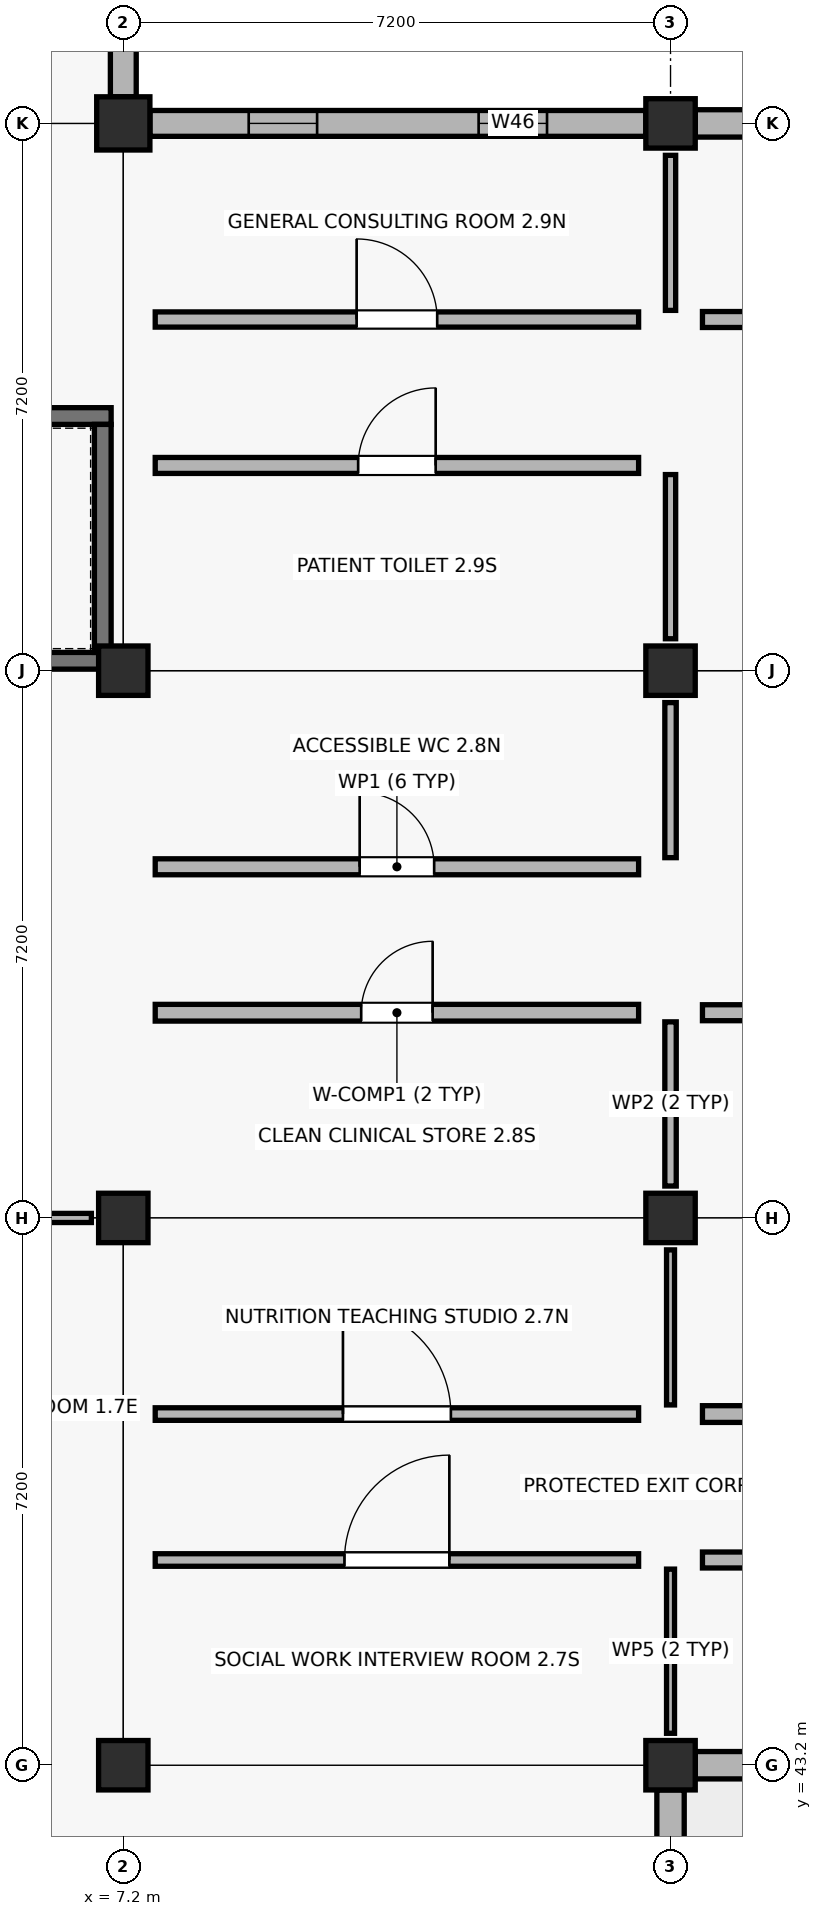
"""IFC4 building model, lengths in metres.
Left out: names, types, materials, properties, quantities, classifications, styles, units other than length and angle.
Written with IfcOpenShell. Run it as: python <this file> out.ifc"""

import sys

from ifc_helpers import new_model, si_unit, direction, frame, frame_2d, origin, origin_2d, place, context, subcontext, project, spatial, rectangle, extrude, element, fill, save


model = new_model("IFC4")
c1 = context("Model", 3, precision=1e-05, world=origin(), true_north=direction((0.0, 1.0)))
c2 = subcontext(c1, "Body", "Model", "MODEL_VIEW")
j1 = project(units=[si_unit("LENGTHUNIT", "METRE"), si_unit("PLANEANGLEUNIT", "RADIAN")], contexts=[c1])
p1 = place(None, origin())
s1 = spatial("IfcSite", under=j1, at=p1, CompositionType="ELEMENT")
p2 = place(p1, origin())
s2 = spatial("IfcBuilding", under=s1, at=p2, CompositionType="ELEMENT")
p3 = place(p2, origin())
s3 = spatial("IfcBuildingStorey", under=s2, at=p3, CompositionType="ELEMENT", Elevation=0.0)
for number, where, z_axis, x_axis in (
    (1, (7.2, 43.2, -0.25), (0.0, 0.0, 1.0), (1.0, 0.0, 0.0)),
    (2, (7.2, 50.4, -0.25), (0.0, 0.0, 1.0), (1.0, 0.0, 0.0)),
    (3, (7.2, 57.6, -0.25), (0.0, 0.0, 1.0), (1.0, 0.0, 0.0)),
):
    element("IfcColumn", number, at=place(p3, frame(where, z_axis=z_axis, x_axis=x_axis)), inside=s3, PredefinedType="COLUMN", context=c2, shape_type="SweptSolid", body=[
        extrude(rectangle(XDim=0.65, YDim=0.65, at=origin_2d()), origin(), (0.0, 0.0, 1.0), 4.75),
    ])
p4 = place(p3, frame((7.2, 64.8, -0.25), z_axis=(0.0, 0.0, 1.0), x_axis=(1.0, 0.0, 0.0)))
e4 = element("IfcColumn", 4, at=p4, inside=s3, PredefinedType="COLUMN", context=c2, shape_type="SweptSolid", body=[
    extrude(rectangle(XDim=0.7, YDim=0.7, at=origin_2d()), origin(), (0.0, 0.0, 1.0), 4.75),
])
for number, where, z_axis, x_axis in (
    (5, (14.4, 43.2, -0.25), (0.0, 0.0, 1.0), (1.0, 0.0, 0.0)),
    (6, (14.4, 50.4, -0.25), (0.0, 0.0, 1.0), (1.0, 0.0, 0.0)),
    (7, (14.4, 57.6, -0.25), (0.0, 0.0, 1.0), (1.0, 0.0, 0.0)),
    (8, (14.4, 64.8, -0.25), (0.0, 0.0, 1.0), (1.0, 0.0, 0.0)),
):
    element("IfcColumn", number, at=place(p3, frame(where, z_axis=z_axis, x_axis=x_axis)), inside=s3, PredefinedType="COLUMN", context=c2, shape_type="SweptSolid", body=[
        extrude(rectangle(XDim=0.65, YDim=0.65, at=origin_2d()), origin(), (0.0, 0.0, 1.0), 4.75),
    ])
p5 = place(p3, frame((7.2, 65.15, 0.0), z_axis=(0.0, 0.0, 1.0), x_axis=(0.0, 1.0, 0.0)))
e9 = element("IfcWall", 9, at=p5, inside=s3, PredefinedType="SOLIDWALL", context=c2, shape_type="SweptSolid", body=[
    extrude(rectangle(XDim=6.5, YDim=0.34, at=frame_2d((3.25, 0.0))), origin(), (0.0, 0.0, 1.0), 3.52),
])
p6 = place(p5, frame((0.775, 0.0, 0.9)))
e10 = element("IfcOpeningElement", 10, at=p6, cuts=e9, PredefinedType="OPENING", context=c2, shape_type="SweptSolid", body=[
    extrude(rectangle(XDim=1.95, YDim=1.5, at=frame_2d((0.975, 0.75))), frame((0.0, 0.18, 0.0), z_axis=(0.0, -1.0, 0.0), x_axis=(1.0, 0.0, 0.0)), (0.0, 0.0, 1.0), 0.36),
])
p7 = place(p5, frame((3.775, 0.0, 0.9)))
e11 = element("IfcOpeningElement", 11, at=p7, cuts=e9, PredefinedType="OPENING", context=c2, shape_type="SweptSolid", body=[
    extrude(rectangle(XDim=1.95, YDim=1.5, at=frame_2d((0.975, 0.75))), frame((0.0, 0.18, 0.0), z_axis=(0.0, -1.0, 0.0), x_axis=(1.0, 0.0, 0.0)), (0.0, 0.0, 1.0), 0.36),
])
p8 = place(p3, frame((14.4, 36.325, 0.0), z_axis=(0.0, 0.0, 1.0), x_axis=(0.0, 1.0, 0.0)))
e12 = element("IfcWall", 12, at=p8, inside=s3, PredefinedType="SOLIDWALL", context=c2, shape_type="SweptSolid", body=[
    extrude(rectangle(XDim=6.55, YDim=0.36, at=frame_2d((3.275, 0.0))), origin(), (0.0, 0.0, 1.0), 3.52),
])
p9 = place(p8, frame((1.0, 0.0, 0.9)))
e13 = element("IfcOpeningElement", 13, at=p9, cuts=e12, PredefinedType="OPENING", context=c2, shape_type="SweptSolid", body=[
    extrude(rectangle(XDim=1.5, YDim=1.75, at=frame_2d((0.75, 0.875))), frame((0.0, 0.19, 0.0), z_axis=(0.0, -1.0, 0.0), x_axis=(1.0, 0.0, 0.0)), (0.0, 0.0, 1.0), 0.38),
])
p10 = place(p8, frame((4.05, 0.0, 0.9)))
e14 = element("IfcOpeningElement", 14, at=p10, cuts=e12, PredefinedType="OPENING", context=c2, shape_type="SweptSolid", body=[
    extrude(rectangle(XDim=1.5, YDim=1.75, at=frame_2d((0.75, 0.875))), frame((0.0, 0.19, 0.0), z_axis=(0.0, -1.0, 0.0), x_axis=(1.0, 0.0, 0.0)), (0.0, 0.0, 1.0), 0.38),
])
p11 = place(p3, frame((14.075, 64.8, 0.0), z_axis=(0.0, 0.0, 1.0), x_axis=(-1.0, 0.0, 0.0)))
e15 = element("IfcWall", 15, at=p11, inside=s3, PredefinedType="SOLIDWALL", context=c2, shape_type="SweptSolid", body=[
    extrude(rectangle(XDim=6.525, YDim=0.34, at=frame_2d((3.262, 0.0))), origin(), (0.0, 0.0, 1.0), 3.47),
])
p12 = place(p11, frame((1.3, 0.0, 0.9)))
e16 = element("IfcOpeningElement", 16, at=p12, cuts=e15, PredefinedType="OPENING", context=c2, shape_type="SweptSolid", body=[
    extrude(rectangle(XDim=0.9, YDim=1.88, at=frame_2d((0.45, 0.94))), frame((0.0, 0.18, 0.0), z_axis=(0.0, -1.0, 0.0), x_axis=(1.0, 0.0, 0.0)), (0.0, 0.0, 1.0), 0.36),
])
p13 = place(p11, frame((4.325, 0.0, 0.9)))
e17 = element("IfcOpeningElement", 17, at=p13, cuts=e15, PredefinedType="OPENING", context=c2, shape_type="SweptSolid", body=[
    extrude(rectangle(XDim=0.9, YDim=1.88, at=frame_2d((0.45, 0.94))), frame((0.0, 0.18, 0.0), z_axis=(0.0, -1.0, 0.0), x_axis=(1.0, 0.0, 0.0)), (0.0, 0.0, 1.0), 0.36),
])
p14 = place(p3, frame((14.725, 43.2, 0.0), z_axis=(0.0, 0.0, 1.0), x_axis=(1.0, 0.0, 0.0)))
e18 = element("IfcWall", 18, at=p14, inside=s3, PredefinedType="SOLIDWALL", context=c2, shape_type="SweptSolid", body=[
    extrude(rectangle(XDim=6.575, YDim=0.36, at=frame_2d((3.288, 0.0))), origin(), (0.0, 0.0, 1.0), 3.47),
])
p15 = place(p14, frame((0.775, 0.0, 0.9)))
e19 = element("IfcOpeningElement", 19, at=p15, cuts=e18, PredefinedType="OPENING", context=c2, shape_type="SweptSolid", body=[
    extrude(rectangle(XDim=1.95, YDim=1.88, at=frame_2d((0.975, 0.94))), frame((0.0, 0.19, 0.0), z_axis=(0.0, -1.0, 0.0), x_axis=(1.0, 0.0, 0.0)), (0.0, 0.0, 1.0), 0.38),
])
p16 = place(p14, frame((3.85, 0.0, 0.9)))
e20 = element("IfcOpeningElement", 20, at=p16, cuts=e18, PredefinedType="OPENING", context=c2, shape_type="SweptSolid", body=[
    extrude(rectangle(XDim=1.95, YDim=1.88, at=frame_2d((0.975, 0.94))), frame((0.0, 0.19, 0.0), z_axis=(0.0, -1.0, 0.0), x_axis=(1.0, 0.0, 0.0)), (0.0, 0.0, 1.0), 0.38),
])
p17 = place(p3, frame((21.275, 64.8, 0.0), z_axis=(0.0, 0.0, 1.0), x_axis=(-1.0, 0.0, 0.0)))
e21 = element("IfcWall", 21, at=p17, inside=s3, PredefinedType="SOLIDWALL", context=c2, shape_type="SweptSolid", body=[
    extrude(rectangle(XDim=6.55, YDim=0.36, at=frame_2d((3.275, 0.0))), origin(), (0.0, 0.0, 1.0), 3.47),
])
p18 = place(p17, frame((1.15, 0.0, 0.9)))
e22 = element("IfcOpeningElement", 22, at=p18, cuts=e21, PredefinedType="OPENING", context=c2, shape_type="SweptSolid", body=[
    extrude(rectangle(XDim=1.2, YDim=1.25, at=frame_2d((0.6, 0.625))), frame((0.0, 0.19, 0.0), z_axis=(0.0, -1.0, 0.0), x_axis=(1.0, 0.0, 0.0)), (0.0, 0.0, 1.0), 0.38),
])
p19 = place(p17, frame((4.2, 0.0, 0.9)))
e23 = element("IfcOpeningElement", 23, at=p19, cuts=e21, PredefinedType="OPENING", context=c2, shape_type="SweptSolid", body=[
    extrude(rectangle(XDim=1.2, YDim=1.25, at=frame_2d((0.6, 0.625))), frame((0.0, 0.19, 0.0), z_axis=(0.0, -1.0, 0.0), x_axis=(1.0, 0.0, 0.0)), (0.0, 0.0, 1.0), 0.38),
])
p20 = place(p3, frame((0.16, 57.73, -0.25), z_axis=(0.0, 0.0, 1.0), x_axis=(1.0, 0.0, 0.0)))
e24 = element("IfcWall", 24, at=p20, inside=s3, PredefinedType="SHEAR", context=c2, shape_type="SweptSolid", body=[
    extrude(rectangle(XDim=6.88, YDim=0.22, at=frame_2d((3.44, 0.0))), origin(), (0.0, 0.0, 1.0), 4.47),
])
p21 = place(p3, frame((0.16, 60.95, -0.25), z_axis=(0.0, 0.0, 1.0), x_axis=(1.0, 0.0, 0.0)))
e25 = element("IfcWall", 25, at=p21, inside=s3, PredefinedType="SHEAR", context=c2, shape_type="SweptSolid", body=[
    extrude(rectangle(XDim=6.88, YDim=0.22, at=frame_2d((3.44, 0.0))), origin(), (0.0, 0.0, 1.0), 4.47),
])
p22 = place(p21, frame((0.35, 0.0, 0.25)))
e26 = element("IfcOpeningElement", 26, at=p22, cuts=e25, PredefinedType="OPENING", context=c2, shape_type="SweptSolid", body=[
    extrude(rectangle(XDim=1.2, YDim=2.15, at=frame_2d((0.6, 1.075))), frame((0.0, 0.12, 0.0), z_axis=(0.0, -1.0, 0.0), x_axis=(1.0, 0.0, 0.0)), (0.0, 0.0, 1.0), 0.24),
])
p23 = place(p3, frame((6.93, 57.84, -0.25), z_axis=(0.0, 0.0, 1.0), x_axis=(0.0, 1.0, 0.0)))
e27 = element("IfcWall", 27, at=p23, inside=s3, PredefinedType="SHEAR", context=c2, shape_type="SweptSolid", body=[
    extrude(rectangle(XDim=3.0, YDim=0.22, at=frame_2d((1.5, 0.0))), origin(), (0.0, 0.0, 1.0), 4.47),
])
p24 = place(p3, frame((7.62, 53.1, 0.0), z_axis=(0.0, 0.0, 1.0), x_axis=(1.0, 0.0, 0.0)))
e28 = element("IfcWall", 28, at=p24, inside=s3, PredefinedType="SOLIDWALL", context=c2, shape_type="SweptSolid", body=[
    extrude(rectangle(XDim=6.36, YDim=0.22, at=frame_2d((3.18, 0.0))), origin(), (0.0, 0.0, 1.0), 3.36),
])
p25 = place(p24, frame((2.71, 0.0, 0.0)))
e29 = element("IfcOpeningElement", 29, at=p25, cuts=e28, PredefinedType="OPENING", context=c2, shape_type="SweptSolid", body=[
    extrude(rectangle(XDim=0.94, YDim=2.09, at=frame_2d((0.47, 1.045))), frame((0.0, 0.12, 0.0), z_axis=(0.0, -1.0, 0.0), x_axis=(1.0, 0.0, 0.0)), (0.0, 0.0, 1.0), 0.24),
])
p26 = place(p3, frame((14.4, 50.82, 0.0), z_axis=(0.0, 0.0, 1.0), x_axis=(0.0, 1.0, 0.0)))
e30 = element("IfcWall", 30, at=p26, inside=s3, PredefinedType="PARTITIONING", context=c2, shape_type="SweptSolid", body=[
    extrude(rectangle(XDim=2.16, YDim=0.15, at=frame_2d((1.08, 0.0))), origin(), (0.0, 0.0, 1.0), 3.36),
])
p27 = place(p3, frame((7.62, 55.02, 0.0), z_axis=(0.0, 0.0, 1.0), x_axis=(1.0, 0.0, 0.0)))
e31 = element("IfcWall", 31, at=p27, inside=s3, PredefinedType="PLUMBINGWALL", context=c2, shape_type="SweptSolid", body=[
    extrude(rectangle(XDim=6.36, YDim=0.21, at=frame_2d((3.18, 0.0))), origin(), (0.0, 0.0, 1.0), 3.36),
])
p28 = place(p27, frame((2.69, 0.0, 0.0)))
e32 = element("IfcOpeningElement", 32, at=p28, cuts=e31, PredefinedType="OPENING", context=c2, shape_type="SweptSolid", body=[
    extrude(rectangle(XDim=0.98, YDim=2.09, at=frame_2d((0.49, 1.045))), frame((0.0, 0.115, 0.0), z_axis=(0.0, -1.0, 0.0), x_axis=(1.0, 0.0, 0.0)), (0.0, 0.0, 1.0), 0.23),
])
p29 = place(p3, frame((14.4, 55.14, 0.0), z_axis=(0.0, 0.0, 1.0), x_axis=(0.0, 1.0, 0.0)))
e33 = element("IfcWall", 33, at=p29, inside=s3, PredefinedType="PARTITIONING", context=c2, shape_type="SweptSolid", body=[
    extrude(rectangle(XDim=2.04, YDim=0.15, at=frame_2d((1.02, 0.0))), origin(), (0.0, 0.0, 1.0), 3.36),
])
p30 = place(p3, frame((7.62, 60.3, 0.0), z_axis=(0.0, 0.0, 1.0), x_axis=(1.0, 0.0, 0.0)))
e34 = element("IfcWall", 34, at=p30, inside=s3, PredefinedType="PLUMBINGWALL", context=c2, shape_type="SweptSolid", body=[
    extrude(rectangle(XDim=6.36, YDim=0.21, at=frame_2d((3.18, 0.0))), origin(), (0.0, 0.0, 1.0), 3.36),
])
p31 = place(p30, frame((2.67, 0.0, 0.0)))
e35 = element("IfcOpeningElement", 35, at=p31, cuts=e34, PredefinedType="OPENING", context=c2, shape_type="SweptSolid", body=[
    extrude(rectangle(XDim=1.02, YDim=2.09, at=frame_2d((0.51, 1.045))), frame((0.0, 0.115, 0.0), z_axis=(0.0, -1.0, 0.0), x_axis=(1.0, 0.0, 0.0)), (0.0, 0.0, 1.0), 0.23),
])
p32 = place(p3, frame((14.4, 58.02, 0.0), z_axis=(0.0, 0.0, 1.0), x_axis=(0.0, 1.0, 0.0)))
e36 = element("IfcWall", 36, at=p32, inside=s3, PredefinedType="PARTITIONING", context=c2, shape_type="SweptSolid", body=[
    extrude(rectangle(XDim=2.16, YDim=0.135, at=frame_2d((1.08, 0.0))), origin(), (0.0, 0.0, 1.0), 3.36),
])
p33 = place(p3, frame((7.62, 62.22, 0.0), z_axis=(0.0, 0.0, 1.0), x_axis=(1.0, 0.0, 0.0)))
e37 = element("IfcWall", 37, at=p33, inside=s3, PredefinedType="SOLIDWALL", context=c2, shape_type="SweptSolid", body=[
    extrude(rectangle(XDim=6.36, YDim=0.2, at=frame_2d((3.18, 0.0))), origin(), (0.0, 0.0, 1.0), 3.36),
])
p34 = place(p33, frame((2.65, 0.0, 0.0)))
e38 = element("IfcOpeningElement", 38, at=p34, cuts=e37, PredefinedType="OPENING", context=c2, shape_type="SweptSolid", body=[
    extrude(rectangle(XDim=1.06, YDim=2.09, at=frame_2d((0.53, 1.045))), frame((0.0, 0.11, 0.0), z_axis=(0.0, -1.0, 0.0), x_axis=(1.0, 0.0, 0.0)), (0.0, 0.0, 1.0), 0.22),
])
p35 = place(p3, frame((14.4, 62.34, 0.0), z_axis=(0.0, 0.0, 1.0), x_axis=(0.0, 1.0, 0.0)))
e39 = element("IfcWall", 39, at=p35, inside=s3, PredefinedType="PARTITIONING", context=c2, shape_type="SweptSolid", body=[
    extrude(rectangle(XDim=2.04, YDim=0.135, at=frame_2d((1.02, 0.0))), origin(), (0.0, 0.0, 1.0), 3.36),
])
p36 = place(p3, frame((14.82, 53.1, 0.0), z_axis=(0.0, 0.0, 1.0), x_axis=(1.0, 0.0, 0.0)))
e40 = element("IfcWall", 40, at=p36, inside=s3, PredefinedType="PLUMBINGWALL", context=c2, shape_type="SweptSolid", body=[
    extrude(rectangle(XDim=6.36, YDim=0.21, at=frame_2d((3.18, 0.0))), origin(), (0.0, 0.0, 1.0), 3.36),
])
p37 = place(p36, frame((2.55, 0.0, 0.0)))
e41 = element("IfcOpeningElement", 41, at=p37, cuts=e40, PredefinedType="OPENING", context=c2, shape_type="SweptSolid", body=[
    extrude(rectangle(XDim=1.26, YDim=2.09, at=frame_2d((0.63, 1.045))), frame((0.0, 0.115, 0.0), z_axis=(0.0, -1.0, 0.0), x_axis=(1.0, 0.0, 0.0)), (0.0, 0.0, 1.0), 0.23),
])
p38 = place(p3, frame((14.82, 62.22, 0.0), z_axis=(0.0, 0.0, 1.0), x_axis=(1.0, 0.0, 0.0)))
e42 = element("IfcWall", 42, at=p38, inside=s3, PredefinedType="PLUMBINGWALL", context=c2, shape_type="SweptSolid", body=[
    extrude(rectangle(XDim=6.36, YDim=0.21, at=frame_2d((3.18, 0.0))), origin(), (0.0, 0.0, 1.0), 3.36),
])
p39 = place(p38, frame((2.53, 0.0, 0.0)))
e43 = element("IfcOpeningElement", 43, at=p39, cuts=e42, PredefinedType="OPENING", context=c2, shape_type="SweptSolid", body=[
    extrude(rectangle(XDim=1.3, YDim=2.09, at=frame_2d((0.65, 1.045))), frame((0.0, 0.115, 0.0), z_axis=(0.0, -1.0, 0.0), x_axis=(1.0, 0.0, 0.0)), (0.0, 0.0, 1.0), 0.23),
])
p40 = place(p3, frame((4.62, 50.4, 0.0), z_axis=(0.0, 0.0, 1.0), x_axis=(1.0, 0.0, 0.0)))
e44 = element("IfcWall", 44, at=p40, inside=s3, PredefinedType="PARTITIONING", context=c2, shape_type="SweptSolid", body=[
    extrude(rectangle(XDim=2.16, YDim=0.12, at=frame_2d((1.08, 0.0))), origin(), (0.0, 0.0, 1.0), 3.36),
])
p41 = place(p3, frame((7.62, 45.9, 0.0), z_axis=(0.0, 0.0, 1.0), x_axis=(1.0, 0.0, 0.0)))
e45 = element("IfcWall", 45, at=p41, inside=s3, PredefinedType="PARTITIONING", context=c2, shape_type="SweptSolid", body=[
    extrude(rectangle(XDim=6.36, YDim=0.165, at=frame_2d((3.18, 0.0))), origin(), (0.0, 0.0, 1.0), 3.36),
])
p42 = place(p41, frame((2.49, 0.0, 0.0)))
e46 = element("IfcOpeningElement", 46, at=p42, cuts=e45, PredefinedType="OPENING", context=c2, shape_type="SweptSolid", body=[
    extrude(rectangle(XDim=1.38, YDim=2.09, at=frame_2d((0.69, 1.045))), frame((0.0, 0.093, 0.0), z_axis=(0.0, -1.0, 0.0), x_axis=(1.0, 0.0, 0.0)), (0.0, 0.0, 1.0), 0.185),
])
p43 = place(p3, frame((14.4, 43.62, 0.0), z_axis=(0.0, 0.0, 1.0), x_axis=(0.0, 1.0, 0.0)))
e47 = element("IfcWall", 47, at=p43, inside=s3, PredefinedType="PARTITIONING", context=c2, shape_type="SweptSolid", body=[
    extrude(rectangle(XDim=2.16, YDim=0.105, at=frame_2d((1.08, 0.0))), origin(), (0.0, 0.0, 1.0), 3.36),
])
p44 = place(p3, frame((7.62, 47.82, 0.0), z_axis=(0.0, 0.0, 1.0), x_axis=(1.0, 0.0, 0.0)))
e48 = element("IfcWall", 48, at=p44, inside=s3, PredefinedType="PARTITIONING", context=c2, shape_type="SweptSolid", body=[
    extrude(rectangle(XDim=6.36, YDim=0.165, at=frame_2d((3.18, 0.0))), origin(), (0.0, 0.0, 1.0), 3.36),
])
p45 = place(p44, frame((2.47, 0.0, 0.0)))
e49 = element("IfcOpeningElement", 49, at=p45, cuts=e48, PredefinedType="OPENING", context=c2, shape_type="SweptSolid", body=[
    extrude(rectangle(XDim=1.42, YDim=2.09, at=frame_2d((0.71, 1.045))), frame((0.0, 0.093, 0.0), z_axis=(0.0, -1.0, 0.0), x_axis=(1.0, 0.0, 0.0)), (0.0, 0.0, 1.0), 0.185),
])
p46 = place(p3, frame((14.4, 47.94, 0.0), z_axis=(0.0, 0.0, 1.0), x_axis=(0.0, 1.0, 0.0)))
e50 = element("IfcWall", 50, at=p46, inside=s3, PredefinedType="PARTITIONING", context=c2, shape_type="SweptSolid", body=[
    extrude(rectangle(XDim=2.04, YDim=0.105, at=frame_2d((1.02, 0.0))), origin(), (0.0, 0.0, 1.0), 3.36),
])
p47 = place(p3, frame((14.82, 45.9, 0.0), z_axis=(0.0, 0.0, 1.0), x_axis=(1.0, 0.0, 0.0)))
e51 = element("IfcWall", 51, at=p47, inside=s3, PredefinedType="PLUMBINGWALL", context=c2, shape_type="SweptSolid", body=[
    extrude(rectangle(XDim=6.36, YDim=0.21, at=frame_2d((3.18, 0.0))), origin(), (0.0, 0.0, 1.0), 3.36),
])
p48 = place(p47, frame((2.45, 0.0, 0.0)))
e52 = element("IfcOpeningElement", 52, at=p48, cuts=e51, PredefinedType="OPENING", context=c2, shape_type="SweptSolid", body=[
    extrude(rectangle(XDim=1.46, YDim=2.09, at=frame_2d((0.73, 1.045))), frame((0.0, 0.115, 0.0), z_axis=(0.0, -1.0, 0.0), x_axis=(1.0, 0.0, 0.0)), (0.0, 0.0, 1.0), 0.23),
])
p49 = place(p3, frame((14.82, 47.82, 0.0), z_axis=(0.0, 0.0, 1.0), x_axis=(1.0, 0.0, 0.0)))
e53 = element("IfcWall", 53, at=p49, inside=s3, PredefinedType="SOLIDWALL", context=c2, shape_type="SweptSolid", body=[
    extrude(rectangle(XDim=6.36, YDim=0.22, at=frame_2d((3.18, 0.0))), origin(), (0.0, 0.0, 1.0), 3.36),
])
p50 = place(p49, frame((2.43, 0.0, 0.0)))
e54 = element("IfcOpeningElement", 54, at=p50, cuts=e53, PredefinedType="OPENING", context=c2, shape_type="SweptSolid", body=[
    extrude(rectangle(XDim=1.5, YDim=2.09, at=frame_2d((0.75, 1.045))), frame((0.0, 0.12, 0.0), z_axis=(0.0, -1.0, 0.0), x_axis=(1.0, 0.0, 0.0)), (0.0, 0.0, 1.0), 0.24),
])
p51 = place(p12, origin())
e55 = element("IfcWindow", 55, at=p51, inside=s3, PartitioningType="SINGLE_PANEL", PredefinedType="WINDOW", context=c2, shape_type="SweptSolid", body=[
    extrude(rectangle(XDim=0.9, YDim=1.88, at=frame_2d((0.45, 0.94))), frame((0.0, 0.03, 0.0), z_axis=(0.0, -1.0, 0.0), x_axis=(1.0, 0.0, 0.0)), (0.0, 0.0, 1.0), 0.06),
])
fill(e16, e55)
p52 = place(p13, origin())
e56 = element("IfcWindow", 56, at=p52, inside=s3, PartitioningType="SINGLE_PANEL", PredefinedType="WINDOW", context=c2, shape_type="SweptSolid", body=[
    extrude(rectangle(XDim=0.9, YDim=1.88, at=frame_2d((0.45, 0.94))), frame((0.0, 0.03, 0.0), z_axis=(0.0, -1.0, 0.0), x_axis=(1.0, 0.0, 0.0)), (0.0, 0.0, 1.0), 0.06),
])
fill(e17, e56)
p53 = place(p25, origin())
e57 = element("IfcDoor", 57, at=p53, inside=s3, OperationType="SINGLE_SWING_RIGHT", PredefinedType="DOOR", context=c2, shape_type="SweptSolid", body=[
    extrude(rectangle(XDim=0.94, YDim=2.09, at=frame_2d((0.47, 1.045))), frame((0.0, 0.025, 0.0), z_axis=(0.0, -1.0, 0.0), x_axis=(1.0, 0.0, 0.0)), (0.0, 0.0, 1.0), 0.05),
])
fill(e29, e57)
p54 = place(p28, origin())
e58 = element("IfcDoor", 58, at=p54, inside=s3, OperationType="SINGLE_SWING_LEFT", PredefinedType="DOOR", context=c2, shape_type="SweptSolid", body=[
    extrude(rectangle(XDim=0.98, YDim=2.09, at=frame_2d((0.49, 1.045))), frame((0.0, 0.025, 0.0), z_axis=(0.0, -1.0, 0.0), x_axis=(1.0, 0.0, 0.0)), (0.0, 0.0, 1.0), 0.05),
])
fill(e32, e58)
p55 = place(p31, origin())
e59 = element("IfcDoor", 59, at=p55, inside=s3, OperationType="SINGLE_SWING_RIGHT", PredefinedType="DOOR", context=c2, shape_type="SweptSolid", body=[
    extrude(rectangle(XDim=1.02, YDim=2.09, at=frame_2d((0.51, 1.045))), frame((0.0, 0.025, 0.0), z_axis=(0.0, -1.0, 0.0), x_axis=(1.0, 0.0, 0.0)), (0.0, 0.0, 1.0), 0.05),
])
fill(e35, e59)
p56 = place(p34, origin())
e60 = element("IfcDoor", 60, at=p56, inside=s3, OperationType="SINGLE_SWING_LEFT", PredefinedType="DOOR", context=c2, shape_type="SweptSolid", body=[
    extrude(rectangle(XDim=1.06, YDim=2.09, at=frame_2d((0.53, 1.045))), frame((0.0, 0.025, 0.0), z_axis=(0.0, -1.0, 0.0), x_axis=(1.0, 0.0, 0.0)), (0.0, 0.0, 1.0), 0.05),
])
fill(e38, e60)
p57 = place(p42, origin())
e61 = element("IfcDoor", 61, at=p57, inside=s3, OperationType="SINGLE_SWING_RIGHT", PredefinedType="DOOR", context=c2, shape_type="SweptSolid", body=[
    extrude(rectangle(XDim=1.38, YDim=2.09, at=frame_2d((0.69, 1.045))), frame((0.0, 0.025, 0.0), z_axis=(0.0, -1.0, 0.0), x_axis=(1.0, 0.0, 0.0)), (0.0, 0.0, 1.0), 0.05),
])
fill(e46, e61)
p58 = place(p45, origin())
e62 = element("IfcDoor", 62, at=p58, inside=s3, OperationType="SINGLE_SWING_LEFT", PredefinedType="DOOR", context=c2, shape_type="SweptSolid", body=[
    extrude(rectangle(XDim=1.42, YDim=2.09, at=frame_2d((0.71, 1.045))), frame((0.0, 0.025, 0.0), z_axis=(0.0, -1.0, 0.0), x_axis=(1.0, 0.0, 0.0)), (0.0, 0.0, 1.0), 0.05),
])
fill(e49, e62)
save(model, sys.argv[1])
